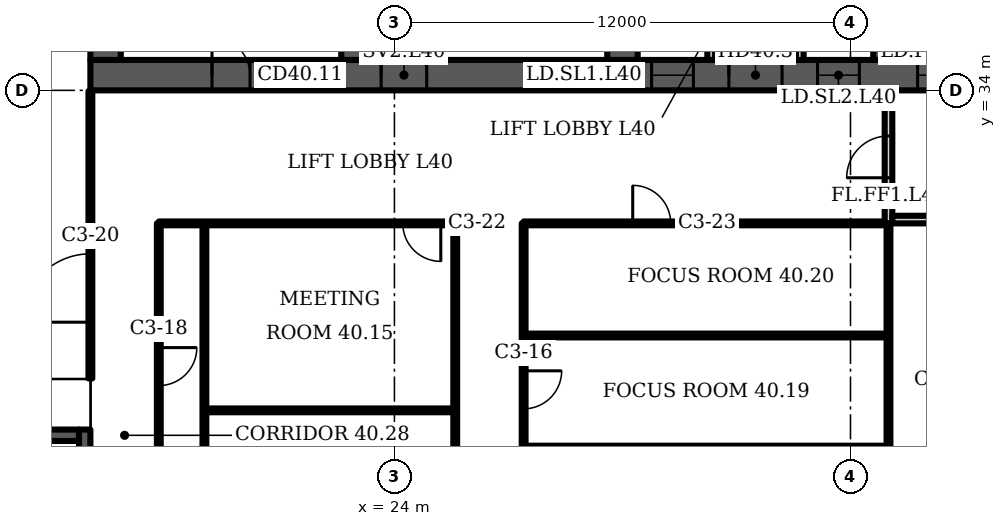
"""IFC4 building model, lengths in metres.
Left out: names, types, materials, properties, quantities, classifications, styles, units other than length and angle.
Written with IfcOpenShell. Run it as: python <this file> out.ifc"""

import sys

from ifc_helpers import new_model, si_unit, direction, frame, frame_2d, origin, place, context, subcontext, project, spatial, polyline, rectangle, outline, extrude, element, fill, save


model = new_model("IFC4")
c1 = context("Model", 3, precision=1e-05, world=origin(), true_north=direction((0.0, 1.0)))
c2 = subcontext(c1, "Body", "Model", "MODEL_VIEW")
j1 = project(units=[si_unit("LENGTHUNIT", "METRE"), si_unit("PLANEANGLEUNIT", "RADIAN")], contexts=[c1])
p1 = place(None, origin())
s1 = spatial("IfcSite", under=j1, at=p1, CompositionType="ELEMENT")
p2 = place(p1, origin())
s2 = spatial("IfcBuilding", under=s1, at=p2, CompositionType="ELEMENT")
p3 = place(p2, frame((0.0, 0.0, 166.3)))
s3 = spatial("IfcBuildingStorey", under=s2, at=p3, CompositionType="ELEMENT", Elevation=166.3)
p4 = place(p3, frame((16.0, 34.4, 0.0), z_axis=(0.0, 0.0, 1.0), x_axis=(1.0, 0.0, 0.0)))
e1 = element("IfcWall", 1, at=p4, inside=s3, PredefinedType="SHEAR", context=c2, shape_type="SweptSolid", body=[
    extrude(rectangle(XDim=42.0, YDim=0.8, at=frame_2d((21.0, 0.0))), origin(), (0.0, 0.0, 1.0), 3.6),
])
p5 = place(p4, frame((3.2, 0.0, 0.0)))
e2 = element("IfcOpeningElement", 2, at=p5, cuts=e1, PredefinedType="OPENING", context=c2, shape_type="SweptSolid", body=[
    extrude(rectangle(XDim=1.0, YDim=2.1, at=frame_2d((0.5, 1.05))), frame((0.0, 0.41, 0.0), z_axis=(0.0, -1.0, 0.0), x_axis=(1.0, 0.0, 0.0)), (0.0, 0.0, 1.0), 0.82),
])
p6 = place(p4, frame((7.65, 0.0, 0.0)))
e3 = element("IfcOpeningElement", 3, at=p6, cuts=e1, PredefinedType="OPENING", context=c2, shape_type="SweptSolid", body=[
    extrude(rectangle(XDim=1.2, YDim=2.1, at=frame_2d((0.6, 1.05))), frame((0.0, 0.41, 0.0), z_axis=(0.0, -1.0, 0.0), x_axis=(1.0, 0.0, 0.0)), (0.0, 0.0, 1.0), 0.82),
])
p7 = place(p4, frame((14.767, 0.0, 0.0)))
e4 = element("IfcOpeningElement", 4, at=p7, cuts=e1, PredefinedType="OPENING", context=c2, shape_type="SweptSolid", body=[
    extrude(rectangle(XDim=1.1, YDim=2.1, at=frame_2d((0.55, 1.05))), frame((0.0, 0.41, 0.0), z_axis=(0.0, -1.0, 0.0), x_axis=(1.0, 0.0, 0.0)), (0.0, 0.0, 1.0), 0.82),
])
p8 = place(p4, frame((19.133, 0.0, 0.0)))
e5 = element("IfcOpeningElement", 5, at=p8, cuts=e1, PredefinedType="OPENING", context=c2, shape_type="SweptSolid", body=[
    extrude(rectangle(XDim=1.1, YDim=2.1, at=frame_2d((0.55, 1.05))), frame((0.0, 0.41, 0.0), z_axis=(0.0, -1.0, 0.0), x_axis=(1.0, 0.0, 0.0)), (0.0, 0.0, 1.0), 0.82),
])
p9 = place(p4, frame((16.8, 0.0, 0.0)))
e6 = element("IfcOpeningElement", 6, at=p9, cuts=e1, PredefinedType="OPENING", context=c2, shape_type="SweptSolid", body=[
    extrude(rectangle(XDim=1.4, YDim=2.1, at=frame_2d((0.7, 1.05))), frame((0.0, 0.41, 0.0), z_axis=(0.0, -1.0, 0.0), x_axis=(1.0, 0.0, 0.0)), (0.0, 0.0, 1.0), 0.82),
])
p10 = place(p4, frame((21.767, 0.0, 0.0)))
e7 = element("IfcOpeningElement", 7, at=p10, cuts=e1, PredefinedType="OPENING", context=c2, shape_type="SweptSolid", body=[
    extrude(rectangle(XDim=1.1, YDim=2.1, at=frame_2d((0.55, 1.05))), frame((0.0, 0.41, 0.0), z_axis=(0.0, -1.0, 0.0), x_axis=(1.0, 0.0, 0.0)), (0.0, 0.0, 1.0), 0.82),
])
p11 = place(p4, frame((23.95, 0.0, 0.0)))
e8 = element("IfcOpeningElement", 8, at=p11, cuts=e1, PredefinedType="OPENING", context=c2, shape_type="SweptSolid", body=[
    extrude(rectangle(XDim=1.1, YDim=2.1, at=frame_2d((0.55, 1.05))), frame((0.0, 0.41, 0.0), z_axis=(0.0, -1.0, 0.0), x_axis=(1.0, 0.0, 0.0)), (0.0, 0.0, 1.0), 0.82),
])
p12 = place(p4, frame((26.133, 0.0, 0.0)))
e9 = element("IfcOpeningElement", 9, at=p12, cuts=e1, PredefinedType="OPENING", context=c2, shape_type="SweptSolid", body=[
    extrude(rectangle(XDim=1.1, YDim=2.1, at=frame_2d((0.55, 1.05))), frame((0.0, 0.41, 0.0), z_axis=(0.0, -1.0, 0.0), x_axis=(1.0, 0.0, 0.0)), (0.0, 0.0, 1.0), 0.82),
])
p13 = place(p4, frame((33.15, 0.0, 0.0)))
e10 = element("IfcOpeningElement", 10, at=p13, cuts=e1, PredefinedType="OPENING", context=c2, shape_type="SweptSolid", body=[
    extrude(rectangle(XDim=1.2, YDim=2.1, at=frame_2d((0.6, 1.05))), frame((0.0, 0.41, 0.0), z_axis=(0.0, -1.0, 0.0), x_axis=(1.0, 0.0, 0.0)), (0.0, 0.0, 1.0), 0.82),
])
p14 = place(p4, frame((35.817, 0.0, 0.0)))
e11 = element("IfcOpeningElement", 11, at=p14, cuts=e1, PredefinedType="OPENING", context=c2, shape_type="SweptSolid", body=[
    extrude(rectangle(XDim=1.0, YDim=2.1, at=frame_2d((0.5, 1.05))), frame((0.0, 0.41, 0.0), z_axis=(0.0, -1.0, 0.0), x_axis=(1.0, 0.0, 0.0)), (0.0, 0.0, 1.0), 0.82),
])
p15 = place(p4, frame((39.95, 0.0, 0.0)))
e12 = element("IfcOpeningElement", 12, at=p15, cuts=e1, PredefinedType="OPENING", context=c2, shape_type="SweptSolid", body=[
    extrude(rectangle(XDim=1.0, YDim=2.1, at=frame_2d((0.5, 1.05))), frame((0.0, 0.41, 0.0), z_axis=(0.0, -1.0, 0.0), x_axis=(1.0, 0.0, 0.0)), (0.0, 0.0, 1.0), 0.82),
])
p16 = place(p4, frame((37.767, 0.0, 0.0)))
e13 = element("IfcOpeningElement", 13, at=p16, cuts=e1, PredefinedType="OPENING", context=c2, shape_type="SweptSolid", body=[
    extrude(rectangle(XDim=1.4, YDim=2.1, at=frame_2d((0.7, 1.05))), frame((0.0, 0.41, 0.0), z_axis=(0.0, -1.0, 0.0), x_axis=(1.0, 0.0, 0.0)), (0.0, 0.0, 1.0), 0.82),
])
p17 = place(p3, frame((16.4, 34.8, 0.0), z_axis=(0.0, 0.0, 1.0), x_axis=(0.0, 1.0, 0.0)))
e14 = element("IfcWall", 14, at=p17, inside=s3, PredefinedType="SHEAR", context=c2, shape_type="SweptSolid", body=[
    extrude(rectangle(XDim=13.184, YDim=0.8, at=frame_2d((6.592, 0.0))), origin(), (0.0, 0.0, 1.0), 3.6),
])
p18 = place(p3, frame((23.0, 34.8, 0.0), z_axis=(0.0, 0.0, 1.0), x_axis=(0.0, 1.0, 0.0)))
e15 = element("IfcWall", 15, at=p18, inside=s3, PredefinedType="SHEAR", context=c2, shape_type="SweptSolid", body=[
    extrude(rectangle(XDim=13.762, YDim=0.8, at=frame_2d((6.881, 0.0))), origin(), (0.0, 0.0, 1.0), 3.6),
])
p19 = place(p18, frame((2.55, 0.0, 0.0)))
e16 = element("IfcOpeningElement", 16, at=p19, cuts=e15, PredefinedType="OPENING", context=c2, shape_type="SweptSolid", body=[
    extrude(rectangle(XDim=1.1, YDim=2.1, at=frame_2d((0.55, 1.05))), frame((0.0, 0.41, 0.0), z_axis=(0.0, -1.0, 0.0), x_axis=(1.0, 0.0, 0.0)), (0.0, 0.0, 1.0), 0.82),
])
p20 = place(p18, frame((10.0, 0.0, 0.0)))
e17 = element("IfcOpeningElement", 17, at=p20, cuts=e15, PredefinedType="OPENING", context=c2, shape_type="SweptSolid", body=[
    extrude(rectangle(XDim=1.0, YDim=2.1, at=frame_2d((0.5, 1.05))), frame((0.0, 0.41, 0.0), z_axis=(0.0, -1.0, 0.0), x_axis=(1.0, 0.0, 0.0)), (0.0, 0.0, 1.0), 0.82),
])
p21 = place(p3, frame((30.0, 34.8, 0.0), z_axis=(0.0, 0.0, 1.0), x_axis=(0.0, 1.0, 0.0)))
e18 = element("IfcWall", 18, at=p21, inside=s3, PredefinedType="SHEAR", context=c2, shape_type="SweptSolid", body=[
    extrude(rectangle(XDim=14.374, YDim=0.8, at=frame_2d((7.187, 0.0))), origin(), (0.0, 0.0, 1.0), 3.6),
])
p22 = place(p21, frame((3.6, 0.0, 0.0)))
e19 = element("IfcOpeningElement", 19, at=p22, cuts=e18, PredefinedType="OPENING", context=c2, shape_type="SweptSolid", body=[
    extrude(rectangle(XDim=1.1, YDim=2.1, at=frame_2d((0.55, 1.05))), frame((0.0, 0.41, 0.0), z_axis=(0.0, -1.0, 0.0), x_axis=(1.0, 0.0, 0.0)), (0.0, 0.0, 1.0), 0.82),
])
p23 = place(p3, frame((37.0, 34.8, 0.0), z_axis=(0.0, 0.0, 1.0), x_axis=(0.0, 1.0, 0.0)))
e20 = element("IfcWall", 20, at=p23, inside=s3, PredefinedType="SHEAR", context=c2, shape_type="SweptSolid", body=[
    extrude(rectangle(XDim=14.987, YDim=0.8, at=frame_2d((7.493, 0.0))), origin(), (0.0, 0.0, 1.0), 3.6),
])
p24 = place(p23, frame((11.312, 0.0, 0.0)))
e21 = element("IfcOpeningElement", 21, at=p24, cuts=e20, PredefinedType="OPENING", context=c2, shape_type="SweptSolid", body=[
    extrude(rectangle(XDim=1.0, YDim=2.1, at=frame_2d((0.5, 1.05))), frame((0.0, 0.41, 0.0), z_axis=(0.0, -1.0, 0.0), x_axis=(1.0, 0.0, 0.0)), (0.0, 0.0, 1.0), 0.82),
])
p25 = place(p23, frame((3.6, 0.0, 0.0)))
e22 = element("IfcOpeningElement", 22, at=p25, cuts=e20, PredefinedType="OPENING", context=c2, shape_type="SweptSolid", body=[
    extrude(rectangle(XDim=1.1, YDim=2.1, at=frame_2d((0.55, 1.05))), frame((0.0, 0.41, 0.0), z_axis=(0.0, -1.0, 0.0), x_axis=(1.0, 0.0, 0.0)), (0.0, 0.0, 1.0), 0.82),
])
p26 = place(p3, frame((0.0, 0.0, -0.0)))
e23 = element("IfcWall", 23, at=p26, inside=s3, PredefinedType="PARTITIONING", context=c2, shape_type="SweptSolid", body=[
    extrude(outline(polyline([(32.233, 37.65), (30.4, 37.65), (30.4, 37.85), (32.233, 37.85), (32.433, 37.85), (32.433, 34.8), (32.233, 34.8), (32.233, 37.65)])), origin(), (0.0, 0.0, 1.0), 3.2),
])
p27 = place(p3, frame((0.0, 0.0, -0.0)))
e24 = element("IfcWall", 24, at=p27, inside=s3, PredefinedType="PARTITIONING", context=c2, shape_type="SweptSolid", body=[
    extrude(outline(polyline([(34.567, 37.85), (34.767, 37.85), (36.6, 37.85), (36.6, 37.65), (34.767, 37.65), (34.767, 34.8), (34.567, 34.8), (34.567, 37.85)])), origin(), (0.0, 0.0, 1.0), 3.2),
])
p28 = place(p3, frame((0.0, 0.0, -0.0)))
e25 = element("IfcWall", 25, at=p28, inside=s3, PredefinedType="PARTITIONING", context=c2, shape_type="SweptSolid", body=[
    extrude(outline(polyline([(41.567, 37.1), (39.433, 37.1), (39.433, 34.8), (39.233, 34.8), (39.233, 37.65), (37.4, 37.65), (37.4, 37.85), (39.233, 37.85), (39.433, 37.85), (39.433, 37.3), (41.567, 37.3), (41.567, 37.55), (41.767, 37.55), (43.6, 37.55), (43.6, 37.35), (41.767, 37.35), (41.767, 34.8), (41.567, 34.8), (41.567, 37.1)])), origin(), (0.0, 0.0, 1.0), 3.2),
])
p29 = place(p3, frame((37.0, 30.5, 0.0), z_axis=(0.0, 0.0, 1.0), x_axis=(0.0, 1.0, 0.0)))
e26 = element("IfcWall", 26, at=p29, inside=s3, PredefinedType="PARTITIONING", context=c2, shape_type="SweptSolid", body=[
    extrude(rectangle(XDim=3.5, YDim=0.2, at=frame_2d((1.75, 0.0))), origin(), (0.0, 0.0, 1.0), 3.2),
])
p30 = place(p29, frame((1.2, 0.0, 0.0)))
e27 = element("IfcOpeningElement", 27, at=p30, cuts=e26, PredefinedType="OPENING", context=c2, shape_type="SweptSolid", body=[
    extrude(rectangle(XDim=1.1, YDim=2.1, at=frame_2d((0.55, 1.05))), frame((0.0, 0.11, 0.0), z_axis=(0.0, -1.0, 0.0), x_axis=(1.0, 0.0, 0.0)), (0.0, 0.0, 1.0), 0.22),
])
p31 = place(p3, frame((37.1, 30.6, 0.0), z_axis=(0.0, 0.0, 1.0), x_axis=(1.0, 0.0, 0.0)))
e28 = element("IfcWall", 28, at=p31, inside=s3, PredefinedType="PARTITIONING", context=c2, shape_type="SweptSolid", body=[
    extrude(rectangle(XDim=2.8, YDim=0.2, at=frame_2d((1.4, 0.0))), origin(), (0.0, 0.0, 1.0), 3.2),
])
p32 = place(p3, frame((15.85, 20.725, 0.0), z_axis=(0.0, 0.0, 1.0), x_axis=(0.0, 1.0, 0.0)))
e29 = element("IfcWall", 29, at=p32, inside=s3, PredefinedType="SHEAR", context=c2, shape_type="SweptSolid", body=[
    extrude(rectangle(XDim=4.35, YDim=0.3, at=frame_2d((2.175, 0.0))), origin(), (0.0, 0.0, 1.0), 3.2),
])
p33 = place(p32, frame((1.575, 0.0, 0.0)))
e30 = element("IfcOpeningElement", 30, at=p33, cuts=e29, PredefinedType="OPENING", context=c2, shape_type="SweptSolid", body=[
    extrude(rectangle(XDim=1.2, YDim=2.1, at=frame_2d((0.6, 1.05))), frame((0.0, 0.16, 0.0), z_axis=(0.0, -1.0, 0.0), x_axis=(1.0, 0.0, 0.0)), (0.0, 0.0, 1.0), 0.32),
])
p34 = place(p3, frame((16.0, 26.42, 0.0), z_axis=(0.0, 0.0, 1.0), x_axis=(0.0, 1.0, 0.0)))
e31 = element("IfcWall", 31, at=p34, inside=s3, PredefinedType="PARTITIONING", context=c2, shape_type="SweptSolid", body=[
    extrude(rectangle(XDim=7.56, YDim=0.1, at=frame_2d((3.78, 0.0))), origin(), (0.0, 0.0, 1.0), 3.2),
])
p35 = place(p34, frame((1.48, 0.0, 0.0)))
e32 = element("IfcOpeningElement", 32, at=p35, cuts=e31, PredefinedType="OPENING", context=c2, shape_type="SweptSolid", body=[
    extrude(rectangle(XDim=1.8, YDim=2.1, at=frame_2d((0.9, 1.05))), frame((0.0, 0.06, 0.0), z_axis=(0.0, -1.0, 0.0), x_axis=(1.0, 0.0, 0.0)), (0.0, 0.0, 1.0), 0.12),
])
p36 = place(p3, frame((17.8, 22.0, 0.0), z_axis=(0.0, 0.0, 1.0), x_axis=(0.0, 1.0, 0.0)))
e33 = element("IfcWall", 33, at=p36, inside=s3, PredefinedType="PARTITIONING", context=c2, shape_type="SweptSolid", body=[
    extrude(rectangle(XDim=8.5, YDim=0.1, at=frame_2d((4.25, 0.0))), origin(), (0.0, 0.0, 1.0), 3.2),
])
p37 = place(p36, frame((4.231, 0.0, 0.0)))
e34 = element("IfcOpeningElement", 34, at=p37, cuts=e33, PredefinedType="OPENING", context=c2, shape_type="SweptSolid", body=[
    extrude(rectangle(XDim=1.0, YDim=2.1, at=frame_2d((0.5, 1.05))), frame((0.0, 0.06, 0.0), z_axis=(0.0, -1.0, 0.0), x_axis=(1.0, 0.0, 0.0)), (0.0, 0.0, 1.0), 0.12),
])
p38 = place(p3, frame((17.8, 30.5, 0.0), z_axis=(0.0, 0.0, 1.0), x_axis=(1.0, 0.0, 0.0)))
e35 = element("IfcWall", 35, at=p38, inside=s3, PredefinedType="PARTITIONING", context=c2, shape_type="SweptSolid", body=[
    extrude(rectangle(XDim=7.8, YDim=0.1, at=frame_2d((3.9, 0.0))), origin(), (0.0, 0.0, 1.0), 3.2),
])
p39 = place(p38, frame((6.42, 0.0, 0.0)))
e36 = element("IfcOpeningElement", 36, at=p39, cuts=e35, PredefinedType="OPENING", context=c2, shape_type="SweptSolid", body=[
    extrude(rectangle(XDim=1.0, YDim=2.1, at=frame_2d((0.5, 1.05))), frame((0.0, 0.06, 0.0), z_axis=(0.0, -1.0, 0.0), x_axis=(1.0, 0.0, 0.0)), (0.0, 0.0, 1.0), 0.12),
])
p40 = place(p3, frame((19.0, 15.745, 0.0), z_axis=(0.0, 0.0, 1.0), x_axis=(0.0, 1.0, 0.0)))
e37 = element("IfcWall", 37, at=p40, inside=s3, PredefinedType="PARTITIONING", context=c2, shape_type="SweptSolid", body=[
    extrude(rectangle(XDim=14.755, YDim=0.1, at=frame_2d((7.377, 0.0))), origin(), (0.0, 0.0, 1.0), 3.2),
])
p41 = place(p3, frame((19.0, 25.58, 0.0), z_axis=(0.0, 0.0, 1.0), x_axis=(1.0, 0.0, 0.0)))
e38 = element("IfcWall", 38, at=p41, inside=s3, PredefinedType="PARTITIONING", context=c2, shape_type="SweptSolid", body=[
    extrude(rectangle(XDim=6.6, YDim=0.1, at=frame_2d((3.3, 0.0))), origin(), (0.0, 0.0, 1.0), 3.2),
])
p42 = place(p3, frame((25.6, 14.67, 0.0), z_axis=(0.0, 0.0, 1.0), x_axis=(0.0, 1.0, 0.0)))
e39 = element("IfcWall", 39, at=p42, inside=s3, PredefinedType="PARTITIONING", context=c2, shape_type="SweptSolid", body=[
    extrude(rectangle(XDim=15.83, YDim=0.1, at=frame_2d((7.915, 0.0))), origin(), (0.0, 0.0, 1.0), 3.2),
])
p43 = place(p42, frame((3.175, 0.0, 0.0)))
e40 = element("IfcOpeningElement", 40, at=p43, cuts=e39, PredefinedType="OPENING", context=c2, shape_type="SweptSolid", body=[
    extrude(rectangle(XDim=1.0, YDim=2.1, at=frame_2d((0.5, 1.05))), frame((0.0, 0.06, 0.0), z_axis=(0.0, -1.0, 0.0), x_axis=(1.0, 0.0, 0.0)), (0.0, 0.0, 1.0), 0.12),
])
p44 = place(p42, frame((8.89, 0.0, 0.0)))
e41 = element("IfcOpeningElement", 41, at=p44, cuts=e39, PredefinedType="OPENING", context=c2, shape_type="SweptSolid", body=[
    extrude(rectangle(XDim=1.0, YDim=2.1, at=frame_2d((0.5, 1.05))), frame((0.0, 0.06, 0.0), z_axis=(0.0, -1.0, 0.0), x_axis=(1.0, 0.0, 0.0)), (0.0, 0.0, 1.0), 0.12),
])
p45 = place(p3, frame((27.4, 14.24, 0.0), z_axis=(0.0, 0.0, 1.0), x_axis=(0.0, 1.0, 0.0)))
e42 = element("IfcWall", 42, at=p45, inside=s3, PredefinedType="PARTITIONING", context=c2, shape_type="SweptSolid", body=[
    extrude(rectangle(XDim=16.26, YDim=0.1, at=frame_2d((8.13, 0.0))), origin(), (0.0, 0.0, 1.0), 3.2),
])
p46 = place(p45, frame((2.525, 0.0, 0.0)))
e43 = element("IfcOpeningElement", 43, at=p46, cuts=e42, PredefinedType="OPENING", context=c2, shape_type="SweptSolid", body=[
    extrude(rectangle(XDim=1.0, YDim=2.1, at=frame_2d((0.5, 1.05))), frame((0.0, 0.06, 0.0), z_axis=(0.0, -1.0, 0.0), x_axis=(1.0, 0.0, 0.0)), (0.0, 0.0, 1.0), 0.12),
])
p47 = place(p45, frame((5.475, 0.0, 0.0)))
e44 = element("IfcOpeningElement", 44, at=p47, cuts=e42, PredefinedType="OPENING", context=c2, shape_type="SweptSolid", body=[
    extrude(rectangle(XDim=1.0, YDim=2.1, at=frame_2d((0.5, 1.05))), frame((0.0, 0.06, 0.0), z_axis=(0.0, -1.0, 0.0), x_axis=(1.0, 0.0, 0.0)), (0.0, 0.0, 1.0), 0.12),
])
p48 = place(p45, frame((8.425, 0.0, 0.0)))
e45 = element("IfcOpeningElement", 45, at=p48, cuts=e42, PredefinedType="OPENING", context=c2, shape_type="SweptSolid", body=[
    extrude(rectangle(XDim=1.0, YDim=2.1, at=frame_2d((0.5, 1.05))), frame((0.0, 0.06, 0.0), z_axis=(0.0, -1.0, 0.0), x_axis=(1.0, 0.0, 0.0)), (0.0, 0.0, 1.0), 0.12),
])
p49 = place(p45, frame((11.38, 0.0, 0.0)))
e46 = element("IfcOpeningElement", 46, at=p49, cuts=e42, PredefinedType="OPENING", context=c2, shape_type="SweptSolid", body=[
    extrude(rectangle(XDim=1.0, YDim=2.1, at=frame_2d((0.5, 1.05))), frame((0.0, 0.06, 0.0), z_axis=(0.0, -1.0, 0.0), x_axis=(1.0, 0.0, 0.0)), (0.0, 0.0, 1.0), 0.12),
])
for number, where, z_axis, x_axis in (
    (47, (27.4, 24.6, 0.0), (0.0, 0.0, 1.0), (1.0, 0.0, 0.0)),
    (48, (27.4, 27.55, 0.0), (0.0, 0.0, 1.0), (1.0, 0.0, 0.0)),
):
    element("IfcWall", number, at=place(p3, frame(where, z_axis=z_axis, x_axis=x_axis)), inside=s3, PredefinedType="PARTITIONING", context=c2, shape_type="SweptSolid", body=[
        extrude(rectangle(XDim=9.6, YDim=0.1, at=frame_2d((4.8, 0.0))), origin(), (0.0, 0.0, 1.0), 3.2),
    ])
p50 = place(p3, frame((27.4, 30.5, 0.0), z_axis=(0.0, 0.0, 1.0), x_axis=(1.0, 0.0, 0.0)))
e49 = element("IfcWall", 49, at=p50, inside=s3, PredefinedType="PARTITIONING", context=c2, shape_type="SweptSolid", body=[
    extrude(rectangle(XDim=9.45, YDim=0.1, at=frame_2d((4.725, 0.0))), origin(), (0.0, 0.0, 1.0), 3.2),
])
p51 = place(p50, frame((2.87, 0.0, 0.0)))
e50 = element("IfcOpeningElement", 50, at=p51, cuts=e49, PredefinedType="OPENING", context=c2, shape_type="SweptSolid", body=[
    extrude(rectangle(XDim=1.0, YDim=2.1, at=frame_2d((0.5, 1.05))), frame((0.0, 0.06, 0.0), z_axis=(0.0, -1.0, 0.0), x_axis=(1.0, 0.0, 0.0)), (0.0, 0.0, 1.0), 0.12),
])
p52 = place(p3, frame((37.0, 15.745, 0.0), z_axis=(0.0, 0.0, 1.0), x_axis=(0.0, 1.0, 0.0)))
e51 = element("IfcWall", 51, at=p52, inside=s3, PredefinedType="PARTITIONING", context=c2, shape_type="SweptSolid", body=[
    extrude(rectangle(XDim=14.755, YDim=0.1, at=frame_2d((7.377, 0.0))), origin(), (0.0, 0.0, 1.0), 3.2),
])
p53 = place(p3, frame((8.2, 24.925, 0.0), z_axis=(0.0, 0.0, 1.0), x_axis=(1.0, 0.0, 0.0)))
e52 = element("IfcWall", 52, at=p53, inside=s3, PredefinedType="SHEAR", context=c2, shape_type="SweptSolid", body=[
    extrude(rectangle(XDim=7.5, YDim=0.3, at=frame_2d((3.75, 0.0))), origin(), (0.0, 0.0, 1.0), 3.2),
])
p54 = place(p5, origin())
e53 = element("IfcDoor", 53, at=p54, inside=s3, OperationType="SINGLE_SWING_LEFT", PredefinedType="DOOR", context=c2, shape_type="SweptSolid", body=[
    extrude(rectangle(XDim=1.0, YDim=2.1, at=frame_2d((0.5, 1.05))), frame((0.0, 0.4, 0.0), z_axis=(0.0, -1.0, 0.0), x_axis=(1.0, 0.0, 0.0)), (0.0, 0.0, 1.0), 0.8),
])
fill(e2, e53)
p55 = place(p6, origin())
e54 = element("IfcDoor", 54, at=p55, inside=s3, OperationType="SINGLE_SWING_LEFT", PredefinedType="DOOR", context=c2, shape_type="SweptSolid", body=[
    extrude(rectangle(XDim=1.2, YDim=2.1, at=frame_2d((0.6, 1.05))), frame((0.0, 0.025, 0.0), z_axis=(0.0, -1.0, 0.0), x_axis=(1.0, 0.0, 0.0)), (0.0, 0.0, 1.0), 0.05),
])
fill(e3, e54)
p56 = place(p7, origin())
e55 = element("IfcDoor", 55, at=p56, inside=s3, OperationType="DOUBLE_DOOR_SLIDING", PredefinedType="DOOR", context=c2, shape_type="SweptSolid", body=[
    extrude(rectangle(XDim=1.1, YDim=2.1, at=frame_2d((0.55, 1.05))), frame((0.0, 0.025, 0.0), z_axis=(0.0, -1.0, 0.0), x_axis=(1.0, 0.0, 0.0)), (0.0, 0.0, 1.0), 0.05),
])
fill(e4, e55)
p57 = place(p8, origin())
e56 = element("IfcDoor", 56, at=p57, inside=s3, OperationType="DOUBLE_DOOR_SLIDING", PredefinedType="DOOR", context=c2, shape_type="SweptSolid", body=[
    extrude(rectangle(XDim=1.1, YDim=2.1, at=frame_2d((0.55, 1.05))), frame((0.0, 0.025, 0.0), z_axis=(0.0, -1.0, 0.0), x_axis=(1.0, 0.0, 0.0)), (0.0, 0.0, 1.0), 0.05),
])
fill(e5, e56)
p58 = place(p9, origin())
e57 = element("IfcDoor", 57, at=p58, inside=s3, OperationType="DOUBLE_DOOR_SINGLE_SWING", PredefinedType="DOOR", context=c2, shape_type="SweptSolid", body=[
    extrude(rectangle(XDim=1.4, YDim=2.1, at=frame_2d((0.7, 1.05))), frame((0.0, 0.025, 0.0), z_axis=(0.0, -1.0, 0.0), x_axis=(1.0, 0.0, 0.0)), (0.0, 0.0, 1.0), 0.05),
])
fill(e6, e57)
p59 = place(p10, origin())
e58 = element("IfcDoor", 58, at=p59, inside=s3, OperationType="DOUBLE_DOOR_SLIDING", PredefinedType="DOOR", context=c2, shape_type="SweptSolid", body=[
    extrude(rectangle(XDim=1.1, YDim=2.1, at=frame_2d((0.55, 1.05))), frame((0.0, 0.025, 0.0), z_axis=(0.0, -1.0, 0.0), x_axis=(1.0, 0.0, 0.0)), (0.0, 0.0, 1.0), 0.05),
])
fill(e7, e58)
p60 = place(p30, origin())
e59 = element("IfcDoor", 59, at=p60, inside=s3, OperationType="SINGLE_SWING_LEFT", PredefinedType="DOOR", context=c2, shape_type="SweptSolid", body=[
    extrude(rectangle(XDim=1.1, YDim=2.1, at=frame_2d((0.55, 1.05))), frame((0.0, 0.025, 0.0), z_axis=(0.0, -1.0, 0.0), x_axis=(1.0, 0.0, 0.0)), (0.0, 0.0, 1.0), 0.05),
])
fill(e27, e59)
p61 = place(p49, origin())
e60 = element("IfcDoor", 60, at=p61, inside=s3, OperationType="SINGLE_SWING_RIGHT", PredefinedType="DOOR", context=c2, shape_type="SweptSolid", body=[
    extrude(rectangle(XDim=1.0, YDim=2.1, at=frame_2d((0.5, 1.05))), frame((0.0, 0.025, 0.0), z_axis=(0.0, -1.0, 0.0), x_axis=(1.0, 0.0, 0.0)), (0.0, 0.0, 1.0), 0.05),
])
fill(e46, e60)
p62 = place(p37, origin())
e61 = element("IfcDoor", 61, at=p62, inside=s3, OperationType="SINGLE_SWING_RIGHT", PredefinedType="DOOR", context=c2, shape_type="SweptSolid", body=[
    extrude(rectangle(XDim=1.0, YDim=2.1, at=frame_2d((0.5, 1.05))), frame((0.0, 0.025, 0.0), z_axis=(0.0, -1.0, 0.0), x_axis=(1.0, 0.0, 0.0)), (0.0, 0.0, 1.0), 0.05),
])
fill(e34, e61)
p63 = place(p35, origin())
e62 = element("IfcDoor", 62, at=p63, inside=s3, OperationType="DOUBLE_DOOR_SINGLE_SWING", PredefinedType="DOOR", context=c2, shape_type="SweptSolid", body=[
    extrude(rectangle(XDim=1.8, YDim=2.1, at=frame_2d((0.9, 1.05))), frame((0.0, 0.025, 0.0), z_axis=(0.0, -1.0, 0.0), x_axis=(1.0, 0.0, 0.0)), (0.0, 0.0, 1.0), 0.05),
])
fill(e32, e62)
p64 = place(p39, origin())
e63 = element("IfcDoor", 63, at=p64, inside=s3, OperationType="SINGLE_SWING_RIGHT", PredefinedType="DOOR", context=c2, shape_type="SweptSolid", body=[
    extrude(rectangle(XDim=1.0, YDim=2.1, at=frame_2d((0.5, 1.05))), frame((0.0, 0.025, 0.0), z_axis=(0.0, -1.0, 0.0), x_axis=(1.0, 0.0, 0.0)), (0.0, 0.0, 1.0), 0.05),
])
fill(e36, e63)
p65 = place(p51, origin())
e64 = element("IfcDoor", 64, at=p65, inside=s3, OperationType="SINGLE_SWING_LEFT", PredefinedType="DOOR", context=c2, shape_type="SweptSolid", body=[
    extrude(rectangle(XDim=1.0, YDim=2.1, at=frame_2d((0.5, 1.05))), frame((0.0, 0.025, 0.0), z_axis=(0.0, -1.0, 0.0), x_axis=(1.0, 0.0, 0.0)), (0.0, 0.0, 1.0), 0.05),
])
fill(e50, e64)
save(model, sys.argv[1])
